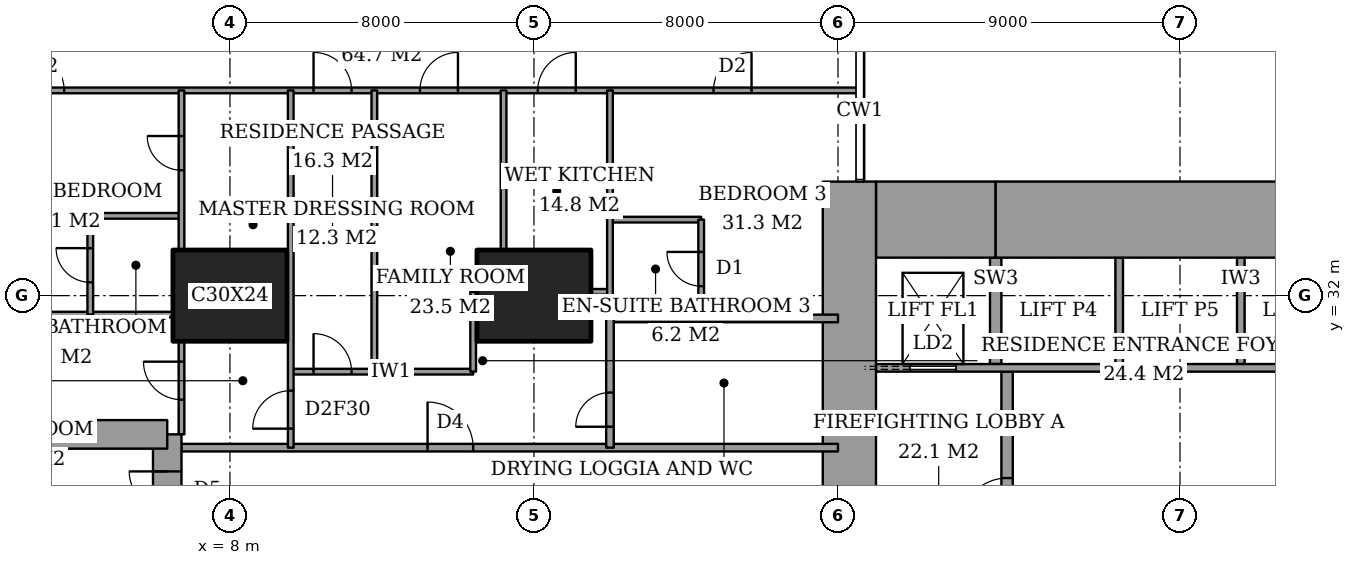
"""IFC4 building model, lengths in metres.
Left out: names, types, materials, properties, quantities, classifications, styles, units other than length and angle.
Written with IfcOpenShell. Run it as: python <this file> out.ifc"""

import sys

from ifc_helpers import new_model, si_unit, direction, frame, frame_2d, origin, origin_2d, place, context, subcontext, project, spatial, rectangle, extrude, element, fill, save


model = new_model("IFC4")
c1 = context("Model", 3, precision=1e-05, world=origin(), true_north=direction((0.0, 1.0)))
c2 = subcontext(c1, "Body", "Model", "MODEL_VIEW")
j1 = project(units=[si_unit("LENGTHUNIT", "METRE"), si_unit("PLANEANGLEUNIT", "RADIAN")], contexts=[c1])
p1 = place(None, origin())
s1 = spatial("IfcSite", under=j1, at=p1, CompositionType="ELEMENT")
p2 = place(p1, origin())
s2 = spatial("IfcBuilding", under=s1, at=p2, CompositionType="ELEMENT")
p3 = place(p2, frame((0.0, 0.0, 150.2)))
s3 = spatial("IfcBuildingStorey", under=s2, at=p3, CompositionType="ELEMENT", Elevation=150.2)
for number, where, z_axis, x_axis in (
    (1, (8.0, 32.0, 0.0), (0.0, 0.0, 1.0), (1.0, 0.0, 0.0)),
    (2, (16.0, 32.0, 0.0), (0.0, 0.0, 1.0), (1.0, 0.0, 0.0)),
):
    element("IfcColumn", number, at=place(p3, frame(where, z_axis=z_axis, x_axis=x_axis)), inside=s3, PredefinedType="COLUMN", context=c2, shape_type="SweptSolid", body=[
        extrude(rectangle(XDim=3.0, YDim=2.4, at=origin_2d()), origin(), (0.0, 0.0, 1.0), 3.6),
    ])
p4 = place(p3, frame((25.0, 34.0, 0.0), z_axis=(0.0, 0.0, 1.0), x_axis=(1.0, 0.0, 0.0)))
e3 = element("IfcWall", 3, at=p4, inside=s3, PredefinedType="SHEAR", context=c2, shape_type="SweptSolid", body=[
    extrude(rectangle(XDim=3.15, YDim=2.0, at=frame_2d((1.575, 0.0))), origin(), (0.0, 0.0, 1.0), 3.6),
])
p5 = place(p3, frame((28.15, 34.0, 0.0), z_axis=(0.0, 0.0, 1.0), x_axis=(1.0, 0.0, 0.0)))
e4 = element("IfcWall", 4, at=p5, inside=s3, PredefinedType="SHEAR", context=c2, shape_type="SweptSolid", body=[
    extrude(rectangle(XDim=9.7, YDim=2.0, at=frame_2d((4.85, 0.0))), origin(), (0.0, 0.0, 1.0), 3.6),
])
p6 = place(p3, frame((24.3, 23.15, 0.0), z_axis=(0.0, 0.0, 1.0), x_axis=(0.0, 1.0, 0.0)))
e5 = element("IfcWall", 5, at=p6, inside=s3, PredefinedType="SHEAR", context=c2, shape_type="SweptSolid", body=[
    extrude(rectangle(XDim=11.85, YDim=1.4, at=frame_2d((5.925, 0.0))), origin(), (0.0, 0.0, 1.0), 3.6),
])
p7 = place(p6, frame((0.75, 0.0, 0.0)))
e6 = element("IfcOpeningElement", 6, at=p7, cuts=e5, PredefinedType="OPENING", context=c2, shape_type="SweptSolid", body=[
    extrude(rectangle(XDim=1.8, YDim=2.4, at=frame_2d((0.9, 1.2))), frame((0.0, 0.71, 0.0), z_axis=(0.0, -1.0, 0.0), x_axis=(1.0, 0.0, 0.0)), (0.0, 0.0, 1.0), 1.42),
])
p8 = place(p3, frame((28.45, 23.3, 0.0), z_axis=(0.0, 0.0, 1.0), x_axis=(0.0, 1.0, 0.0)))
e7 = element("IfcWall", 7, at=p8, inside=s3, PredefinedType="PARTITIONING", context=c2, shape_type="SweptSolid", body=[
    extrude(rectangle(XDim=6.7, YDim=0.3, at=frame_2d((3.35, 0.0))), origin(), (0.0, 0.0, 1.0), 3.6),
])
p9 = place(p8, frame((2.7, 0.0, 0.0)))
e8 = element("IfcOpeningElement", 8, at=p9, cuts=e7, PredefinedType="OPENING", context=c2, shape_type="SweptSolid", body=[
    extrude(rectangle(XDim=1.2, YDim=2.1, at=frame_2d((0.6, 1.05))), frame((0.0, 0.16, 0.0), z_axis=(0.0, -1.0, 0.0), x_axis=(1.0, 0.0, 0.0)), (0.0, 0.0, 1.0), 0.32),
])
p10 = place(p3, frame((6.35, 19.65, 0.0), z_axis=(0.0, 0.0, 1.0), x_axis=(0.0, 1.0, 0.0)))
e9 = element("IfcWall", 9, at=p10, inside=s3, PredefinedType="SHEAR", context=c2, shape_type="SweptSolid", body=[
    extrude(rectangle(XDim=8.7, YDim=0.75, at=frame_2d((4.35, 0.0))), origin(), (0.0, 0.0, 1.0), 3.6),
])
p11 = place(p10, frame((6.725, 0.0, 0.0)))
e10 = element("IfcOpeningElement", 10, at=p11, cuts=e9, PredefinedType="OPENING", context=c2, shape_type="SweptSolid", body=[
    extrude(rectangle(XDim=1.0, YDim=2.1, at=frame_2d((0.5, 1.05))), frame((0.0, 0.385, 0.0), z_axis=(0.0, -1.0, 0.0), x_axis=(1.0, 0.0, 0.0)), (0.0, 0.0, 1.0), 0.77),
])
p12 = place(p3, frame((6.35, 28.35, 0.0), z_axis=(0.0, 0.0, 1.0), x_axis=(-1.0, 0.0, 0.0)))
e11 = element("IfcWall", 11, at=p12, inside=s3, PredefinedType="SHEAR", context=c2, shape_type="SweptSolid", body=[
    extrude(rectangle(XDim=4.45, YDim=0.75, at=frame_2d((2.225, 0.0))), origin(), (0.0, 0.0, 1.0), 3.6),
])
p13 = place(p3, frame((6.725, 28.0, 0.0), z_axis=(0.0, 0.0, 1.0), x_axis=(1.0, 0.0, 0.0)))
e12 = element("IfcWall", 12, at=p13, inside=s3, PredefinedType="PARTITIONING", context=c2, shape_type="SweptSolid", body=[
    extrude(rectangle(XDim=17.275, YDim=0.2, at=frame_2d((8.637, 0.0))), origin(), (0.0, 0.0, 1.0), 3.35),
])
p14 = place(p13, frame((6.475, 0.0, 0.0)))
e13 = element("IfcOpeningElement", 13, at=p14, cuts=e12, PredefinedType="OPENING", context=c2, shape_type="SweptSolid", body=[
    extrude(rectangle(XDim=1.2, YDim=2.4, at=frame_2d((0.6, 1.2))), frame((0.0, 0.11, 0.0), z_axis=(0.0, -1.0, 0.0), x_axis=(1.0, 0.0, 0.0)), (0.0, 0.0, 1.0), 0.22),
])
p15 = place(p3, frame((9.6, 30.0, 0.0), z_axis=(0.0, 0.0, 1.0), x_axis=(1.0, 0.0, 0.0)))
e14 = element("IfcWall", 14, at=p15, inside=s3, PredefinedType="PARTITIONING", context=c2, shape_type="SweptSolid", body=[
    extrude(rectangle(XDim=4.8, YDim=0.15, at=frame_2d((2.4, 0.0))), origin(), (0.0, 0.0, 1.0), 3.35),
])
p16 = place(p15, frame((0.6, 0.0, 0.0)))
e15 = element("IfcOpeningElement", 15, at=p16, cuts=e14, PredefinedType="OPENING", context=c2, shape_type="SweptSolid", body=[
    extrude(rectangle(XDim=1.0, YDim=2.1, at=frame_2d((0.5, 1.05))), frame((0.0, 0.085, 0.0), z_axis=(0.0, -1.0, 0.0), x_axis=(1.0, 0.0, 0.0)), (0.0, 0.0, 1.0), 0.17),
])
p17 = place(p3, frame((18.0, 31.4, 0.0), z_axis=(0.0, 0.0, 1.0), x_axis=(1.0, 0.0, 0.0)))
e16 = element("IfcWall", 16, at=p17, inside=s3, PredefinedType="PARTITIONING", context=c2, shape_type="SweptSolid", body=[
    extrude(rectangle(XDim=6.0, YDim=0.2, at=frame_2d((3.0, 0.0))), origin(), (0.0, 0.0, 1.0), 3.35),
])
p18 = place(p3, frame((1.35, 31.5, 0.0), z_axis=(0.0, 0.0, 1.0), x_axis=(1.0, 0.0, 0.0)))
e17 = element("IfcWall", 17, at=p18, inside=s3, PredefinedType="PARTITIONING", context=c2, shape_type="SweptSolid", body=[
    extrude(rectangle(XDim=5.15, YDim=0.15, at=frame_2d((2.575, 0.0))), origin(), (0.0, 0.0, 1.0), 3.35),
])
p19 = place(p3, frame((17.5, 32.1, 0.0), z_axis=(0.0, 0.0, 1.0), x_axis=(1.0, 0.0, 0.0)))
e18 = element("IfcWall", 18, at=p19, inside=s3, PredefinedType="PARTITIONING", context=c2, shape_type="SweptSolid", body=[
    extrude(rectangle(XDim=0.5, YDim=0.15, at=frame_2d((0.25, 0.0))), origin(), (0.0, 0.0, 1.0), 2.634),
])
p20 = place(p3, frame((18.0, 34.0, 0.0), z_axis=(0.0, 0.0, 1.0), x_axis=(1.0, 0.0, 0.0)))
e19 = element("IfcWall", 19, at=p20, inside=s3, PredefinedType="PARTITIONING", context=c2, shape_type="SweptSolid", body=[
    extrude(rectangle(XDim=2.4, YDim=0.15, at=frame_2d((1.2, 0.0))), origin(), (0.0, 0.0, 1.0), 3.35),
])
p21 = place(p3, frame((4.325, 34.1, 0.0), z_axis=(0.0, 0.0, 1.0), x_axis=(1.0, 0.0, 0.0)))
e20 = element("IfcWall", 20, at=p21, inside=s3, PredefinedType="PARTITIONING", context=c2, shape_type="SweptSolid", body=[
    extrude(rectangle(XDim=2.4, YDim=0.15, at=frame_2d((1.2, 0.0))), origin(), (0.0, 0.0, 1.0), 3.35),
])
p22 = place(p3, frame((-0.45, 37.4, 0.0), z_axis=(0.0, 0.0, 1.0), x_axis=(1.0, 0.0, 0.0)))
e21 = element("IfcWall", 21, at=p22, inside=s3, PredefinedType="PARTITIONING", context=c2, shape_type="SweptSolid", body=[
    extrude(rectangle(XDim=25.011, YDim=0.15, at=frame_2d((12.505, 0.0))), origin(), (0.0, 0.0, 1.0), 3.35),
])
p23 = place(p22, frame((10.65, 0.0, 0.0)))
e22 = element("IfcOpeningElement", 22, at=p23, cuts=e21, PredefinedType="OPENING", context=c2, shape_type="SweptSolid", body=[
    extrude(rectangle(XDim=1.0, YDim=2.1, at=frame_2d((0.5, 1.05))), frame((0.0, 0.085, 0.0), z_axis=(0.0, -1.0, 0.0), x_axis=(1.0, 0.0, 0.0)), (0.0, 0.0, 1.0), 0.17),
])
p24 = place(p22, frame((3.087, 0.0, 0.0)))
e23 = element("IfcOpeningElement", 23, at=p24, cuts=e21, PredefinedType="OPENING", context=c2, shape_type="SweptSolid", body=[
    extrude(rectangle(XDim=1.0, YDim=2.1, at=frame_2d((0.5, 1.05))), frame((0.0, 0.085, 0.0), z_axis=(0.0, -1.0, 0.0), x_axis=(1.0, 0.0, 0.0)), (0.0, 0.0, 1.0), 0.17),
])
p25 = place(p22, frame((13.45, 0.0, 0.0)))
e24 = element("IfcOpeningElement", 24, at=p25, cuts=e21, PredefinedType="OPENING", context=c2, shape_type="SweptSolid", body=[
    extrude(rectangle(XDim=1.0, YDim=2.1, at=frame_2d((0.5, 1.05))), frame((0.0, 0.085, 0.0), z_axis=(0.0, -1.0, 0.0), x_axis=(1.0, 0.0, 0.0)), (0.0, 0.0, 1.0), 0.17),
])
p26 = place(p22, frame((16.55, 0.0, 0.0)))
e25 = element("IfcOpeningElement", 25, at=p26, cuts=e21, PredefinedType="OPENING", context=c2, shape_type="SweptSolid", body=[
    extrude(rectangle(XDim=1.0, YDim=2.1, at=frame_2d((0.5, 1.05))), frame((0.0, 0.085, 0.0), z_axis=(0.0, -1.0, 0.0), x_axis=(1.0, 0.0, 0.0)), (0.0, 0.0, 1.0), 0.17),
])
p27 = place(p22, frame((21.175, 0.0, 0.0)))
e26 = element("IfcOpeningElement", 26, at=p27, cuts=e21, PredefinedType="OPENING", context=c2, shape_type="SweptSolid", body=[
    extrude(rectangle(XDim=1.0, YDim=2.1, at=frame_2d((0.5, 1.05))), frame((0.0, 0.085, 0.0), z_axis=(0.0, -1.0, 0.0), x_axis=(1.0, 0.0, 0.0)), (0.0, 0.0, 1.0), 0.17),
])
p28 = place(p3, frame((4.325, 31.5, 0.0), z_axis=(0.0, 0.0, 1.0), x_axis=(0.0, 1.0, 0.0)))
e27 = element("IfcWall", 27, at=p28, inside=s3, PredefinedType="PARTITIONING", context=c2, shape_type="SweptSolid", body=[
    extrude(rectangle(XDim=2.6, YDim=0.15, at=frame_2d((1.3, 0.0))), origin(), (0.0, 0.0, 1.0), 3.35),
])
p29 = place(p28, frame((0.85, 0.0, 0.0)))
e28 = element("IfcOpeningElement", 28, at=p29, cuts=e27, PredefinedType="OPENING", context=c2, shape_type="SweptSolid", body=[
    extrude(rectangle(XDim=0.9, YDim=2.1, at=frame_2d((0.45, 1.05))), frame((0.0, 0.085, 0.0), z_axis=(0.0, -1.0, 0.0), x_axis=(1.0, 0.0, 0.0)), (0.0, 0.0, 1.0), 0.17),
])
p30 = place(p3, frame((6.725, 28.35, 0.0), z_axis=(0.0, 0.0, 1.0), x_axis=(0.0, 1.0, 0.0)))
e29 = element("IfcWall", 29, at=p30, inside=s3, PredefinedType="PARTITIONING", context=c2, shape_type="SweptSolid", body=[
    extrude(rectangle(XDim=2.45, YDim=0.15, at=frame_2d((1.225, 0.0))), origin(), (0.0, 0.0, 1.0), 3.35),
])
p31 = place(p30, frame((0.913, 0.0, 0.0)))
e30 = element("IfcOpeningElement", 30, at=p31, cuts=e29, PredefinedType="OPENING", context=c2, shape_type="SweptSolid", body=[
    extrude(rectangle(XDim=1.0, YDim=2.1, at=frame_2d((0.5, 1.05))), frame((0.0, 0.085, 0.0), z_axis=(0.0, -1.0, 0.0), x_axis=(1.0, 0.0, 0.0)), (0.0, 0.0, 1.0), 0.17),
])
p32 = place(p3, frame((6.725, 33.2, 0.0), z_axis=(0.0, 0.0, 1.0), x_axis=(0.0, 1.0, 0.0)))
e31 = element("IfcWall", 31, at=p32, inside=s3, PredefinedType="PARTITIONING", context=c2, shape_type="SweptSolid", body=[
    extrude(rectangle(XDim=4.2, YDim=0.15, at=frame_2d((2.1, 0.0))), origin(), (0.0, 0.0, 1.0), 3.35),
])
p33 = place(p32, frame((2.1, 0.0, 0.0)))
e32 = element("IfcOpeningElement", 32, at=p33, cuts=e31, PredefinedType="OPENING", context=c2, shape_type="SweptSolid", body=[
    extrude(rectangle(XDim=0.9, YDim=2.1, at=frame_2d((0.45, 1.05))), frame((0.0, 0.085, 0.0), z_axis=(0.0, -1.0, 0.0), x_axis=(1.0, 0.0, 0.0)), (0.0, 0.0, 1.0), 0.17),
])
p34 = place(p3, frame((9.6, 28.0, 0.0), z_axis=(0.0, 0.0, 1.0), x_axis=(0.0, 1.0, 0.0)))
e33 = element("IfcWall", 33, at=p34, inside=s3, PredefinedType="PARTITIONING", context=c2, shape_type="SweptSolid", body=[
    extrude(rectangle(XDim=9.4, YDim=0.15, at=frame_2d((4.7, 0.0))), origin(), (0.0, 0.0, 1.0), 3.35),
])
p35 = place(p34, frame((0.5, 0.0, 0.0)))
e34 = element("IfcOpeningElement", 34, at=p35, cuts=e33, PredefinedType="OPENING", context=c2, shape_type="SweptSolid", body=[
    extrude(rectangle(XDim=1.0, YDim=2.1, at=frame_2d((0.5, 1.05))), frame((0.0, 0.085, 0.0), z_axis=(0.0, -1.0, 0.0), x_axis=(1.0, 0.0, 0.0)), (0.0, 0.0, 1.0), 0.17),
])
p36 = place(p3, frame((11.8, 30.0, 0.0), z_axis=(0.0, 0.0, 1.0), x_axis=(0.0, 1.0, 0.0)))
e35 = element("IfcWall", 35, at=p36, inside=s3, PredefinedType="PARTITIONING", context=c2, shape_type="SweptSolid", body=[
    extrude(rectangle(XDim=7.4, YDim=0.15, at=frame_2d((3.7, 0.0))), origin(), (0.0, 0.0, 1.0), 3.35),
])
p37 = place(p3, frame((14.4, 30.0, 0.0), z_axis=(0.0, 0.0, 1.0), x_axis=(0.0, 1.0, 0.0)))
e36 = element("IfcWall", 36, at=p37, inside=s3, PredefinedType="PARTITIONING", context=c2, shape_type="SweptSolid", body=[
    extrude(rectangle(XDim=2.1, YDim=0.15, at=frame_2d((1.05, 0.0))), origin(), (0.0, 0.0, 1.0), 3.35),
])
p38 = place(p3, frame((15.2, 33.2, 0.0), z_axis=(0.0, 0.0, 1.0), x_axis=(0.0, 1.0, 0.0)))
e37 = element("IfcWall", 37, at=p38, inside=s3, PredefinedType="PARTITIONING", context=c2, shape_type="SweptSolid", body=[
    extrude(rectangle(XDim=4.2, YDim=0.15, at=frame_2d((2.1, 0.0))), origin(), (0.0, 0.0, 1.0), 3.35),
])
p39 = place(p3, frame((18.0, 28.0, 0.0), z_axis=(0.0, 0.0, 1.0), x_axis=(0.0, 1.0, 0.0)))
e38 = element("IfcWall", 38, at=p39, inside=s3, PredefinedType="PARTITIONING", context=c2, shape_type="SweptSolid", body=[
    extrude(rectangle(XDim=3.4, YDim=0.2, at=frame_2d((1.7, 0.0))), origin(), (0.0, 0.0, 1.0), 3.35),
])
p40 = place(p39, frame((0.55, 0.0, 0.0)))
e39 = element("IfcOpeningElement", 39, at=p40, cuts=e38, PredefinedType="OPENING", context=c2, shape_type="SweptSolid", body=[
    extrude(rectangle(XDim=0.9, YDim=2.1, at=frame_2d((0.45, 1.05))), frame((0.0, 0.11, 0.0), z_axis=(0.0, -1.0, 0.0), x_axis=(1.0, 0.0, 0.0)), (0.0, 0.0, 1.0), 0.22),
])
p41 = place(p3, frame((18.0, 31.4, 0.0), z_axis=(0.0, 0.0, 1.0), x_axis=(0.0, 1.0, 0.0)))
e40 = element("IfcWall", 40, at=p41, inside=s3, PredefinedType="PARTITIONING", context=c2, shape_type="SweptSolid", body=[
    extrude(rectangle(XDim=6.0, YDim=0.15, at=frame_2d((3.0, 0.0))), origin(), (0.0, 0.0, 1.0), 3.35),
])
p42 = place(p3, frame((20.4, 31.4, 0.0), z_axis=(0.0, 0.0, 1.0), x_axis=(0.0, 1.0, 0.0)))
e41 = element("IfcWall", 41, at=p42, inside=s3, PredefinedType="PARTITIONING", context=c2, shape_type="SweptSolid", body=[
    extrude(rectangle(XDim=2.6, YDim=0.15, at=frame_2d((1.3, 0.0))), origin(), (0.0, 0.0, 1.0), 3.35),
])
p43 = place(p42, frame((0.85, 0.0, 0.0)))
e42 = element("IfcOpeningElement", 42, at=p43, cuts=e41, PredefinedType="OPENING", context=c2, shape_type="SweptSolid", body=[
    extrude(rectangle(XDim=0.9, YDim=2.1, at=frame_2d((0.45, 1.05))), frame((0.0, 0.085, 0.0), z_axis=(0.0, -1.0, 0.0), x_axis=(1.0, 0.0, 0.0)), (0.0, 0.0, 1.0), 0.17),
])
p44 = place(p3, frame((25.0, 30.1, 0.0), z_axis=(0.0, 0.0, 1.0), x_axis=(1.0, 0.0, 0.0)))
e43 = element("IfcWall", 43, at=p44, inside=s3, PredefinedType="PARTITIONING", context=c2, shape_type="SweptSolid", body=[
    extrude(rectangle(XDim=12.7, YDim=0.2, at=frame_2d((6.35, 0.0))), origin(), (0.0, 0.0, 1.0), 3.6),
])
p45 = place(p44, frame((0.9, 0.0, 0.0)))
e44 = element("IfcOpeningElement", 44, at=p45, cuts=e43, PredefinedType="OPENING", context=c2, shape_type="SweptSolid", body=[
    extrude(rectangle(XDim=1.2, YDim=2.1, at=frame_2d((0.6, 1.05))), frame((0.0, 0.11, 0.0), z_axis=(0.0, -1.0, 0.0), x_axis=(1.0, 0.0, 0.0)), (0.0, 0.0, 1.0), 0.22),
])
for number, where, z_axis, x_axis in (
    (45, (31.4, 30.2, 0.0), (0.0, 0.0, 1.0), (0.0, 1.0, 0.0)),
    (46, (34.6, 30.2, 0.0), (0.0, 0.0, 1.0), (0.0, 1.0, 0.0)),
):
    element("IfcWall", number, at=place(p3, frame(where, z_axis=z_axis, x_axis=x_axis)), inside=s3, PredefinedType="PARTITIONING", context=c2, shape_type="SweptSolid", body=[
        extrude(rectangle(XDim=2.8, YDim=0.2, at=frame_2d((1.4, 0.0))), origin(), (0.0, 0.0, 1.0), 3.6),
    ])
p46 = place(p3, frame((28.15, 30.2, 0.0), z_axis=(0.0, 0.0, 1.0), x_axis=(0.0, 1.0, 0.0)))
e47 = element("IfcWall", 47, at=p46, inside=s3, PredefinedType="SHEAR", context=c2, shape_type="SweptSolid", body=[
    extrude(rectangle(XDim=2.8, YDim=0.3, at=frame_2d((1.4, 0.0))), origin(), (0.0, 0.0, 1.0), 3.6),
])
p47 = place(p23, origin())
e48 = element("IfcDoor", 48, at=p47, inside=s3, OperationType="SINGLE_SWING_RIGHT", PredefinedType="DOOR", context=c2, shape_type="SweptSolid", body=[
    extrude(rectangle(XDim=1.0, YDim=2.1, at=frame_2d((0.5, 1.05))), frame((0.0, 0.025, 0.0), z_axis=(0.0, -1.0, 0.0), x_axis=(1.0, 0.0, 0.0)), (0.0, 0.0, 1.0), 0.05),
])
fill(e22, e48)
p48 = place(p29, origin())
e49 = element("IfcDoor", 49, at=p48, inside=s3, OperationType="SINGLE_SWING_LEFT", PredefinedType="DOOR", context=c2, shape_type="SweptSolid", body=[
    extrude(rectangle(XDim=0.9, YDim=2.1, at=frame_2d((0.45, 1.05))), frame((0.0, 0.025, 0.0), z_axis=(0.0, -1.0, 0.0), x_axis=(1.0, 0.0, 0.0)), (0.0, 0.0, 1.0), 0.05),
])
fill(e28, e49)
p49 = place(p24, origin())
e50 = element("IfcDoor", 50, at=p49, inside=s3, OperationType="SINGLE_SWING_RIGHT", PredefinedType="DOOR", context=c2, shape_type="SweptSolid", body=[
    extrude(rectangle(XDim=1.0, YDim=2.1, at=frame_2d((0.5, 1.05))), frame((0.0, 0.025, 0.0), z_axis=(0.0, -1.0, 0.0), x_axis=(1.0, 0.0, 0.0)), (0.0, 0.0, 1.0), 0.05),
])
fill(e23, e50)
p50 = place(p31, origin())
e51 = element("IfcDoor", 51, at=p50, inside=s3, OperationType="SINGLE_SWING_LEFT", PredefinedType="DOOR", context=c2, shape_type="SweptSolid", body=[
    extrude(rectangle(XDim=1.0, YDim=2.1, at=frame_2d((0.5, 1.05))), frame((0.0, 0.025, 0.0), z_axis=(0.0, -1.0, 0.0), x_axis=(1.0, 0.0, 0.0)), (0.0, 0.0, 1.0), 0.05),
])
fill(e30, e51)
p51 = place(p33, origin())
e52 = element("IfcDoor", 52, at=p51, inside=s3, OperationType="SINGLE_SWING_LEFT", PredefinedType="DOOR", context=c2, shape_type="SweptSolid", body=[
    extrude(rectangle(XDim=0.9, YDim=2.1, at=frame_2d((0.45, 1.05))), frame((0.0, 0.025, 0.0), z_axis=(0.0, -1.0, 0.0), x_axis=(1.0, 0.0, 0.0)), (0.0, 0.0, 1.0), 0.05),
])
fill(e32, e52)
p52 = place(p35, origin())
e53 = element("IfcDoor", 53, at=p52, inside=s3, OperationType="SINGLE_SWING_RIGHT", PredefinedType="DOOR", context=c2, shape_type="SweptSolid", body=[
    extrude(rectangle(XDim=1.0, YDim=2.1, at=frame_2d((0.5, 1.05))), frame((0.0, 0.025, 0.0), z_axis=(0.0, -1.0, 0.0), x_axis=(1.0, 0.0, 0.0)), (0.0, 0.0, 1.0), 0.05),
])
fill(e34, e53)
p53 = place(p14, origin())
e54 = element("IfcDoor", 54, at=p53, inside=s3, OperationType="SINGLE_SWING_RIGHT", PredefinedType="DOOR", context=c2, shape_type="SweptSolid", body=[
    extrude(rectangle(XDim=1.2, YDim=2.4, at=frame_2d((0.6, 1.2))), frame((0.0, 0.025, 0.0), z_axis=(0.0, -1.0, 0.0), x_axis=(1.0, 0.0, 0.0)), (0.0, 0.0, 1.0), 0.05),
])
fill(e13, e54)
p54 = place(p16, origin())
e55 = element("IfcDoor", 55, at=p54, inside=s3, OperationType="SINGLE_SWING_RIGHT", PredefinedType="DOOR", context=c2, shape_type="SweptSolid", body=[
    extrude(rectangle(XDim=1.0, YDim=2.1, at=frame_2d((0.5, 1.05))), frame((0.0, 0.025, 0.0), z_axis=(0.0, -1.0, 0.0), x_axis=(1.0, 0.0, 0.0)), (0.0, 0.0, 1.0), 0.05),
])
fill(e15, e55)
p55 = place(p25, origin())
e56 = element("IfcDoor", 56, at=p55, inside=s3, OperationType="SINGLE_SWING_LEFT", PredefinedType="DOOR", context=c2, shape_type="SweptSolid", body=[
    extrude(rectangle(XDim=1.0, YDim=2.1, at=frame_2d((0.5, 1.05))), frame((0.0, 0.025, 0.0), z_axis=(0.0, -1.0, 0.0), x_axis=(1.0, 0.0, 0.0)), (0.0, 0.0, 1.0), 0.05),
])
fill(e24, e56)
p56 = place(p26, origin())
e57 = element("IfcDoor", 57, at=p56, inside=s3, OperationType="SINGLE_SWING_LEFT", PredefinedType="DOOR", context=c2, shape_type="SweptSolid", body=[
    extrude(rectangle(XDim=1.0, YDim=2.1, at=frame_2d((0.5, 1.05))), frame((0.0, 0.025, 0.0), z_axis=(0.0, -1.0, 0.0), x_axis=(1.0, 0.0, 0.0)), (0.0, 0.0, 1.0), 0.05),
])
fill(e25, e57)
p57 = place(p43, origin())
e58 = element("IfcDoor", 58, at=p57, inside=s3, OperationType="SINGLE_SWING_LEFT", PredefinedType="DOOR", context=c2, shape_type="SweptSolid", body=[
    extrude(rectangle(XDim=0.9, YDim=2.1, at=frame_2d((0.45, 1.05))), frame((0.0, 0.025, 0.0), z_axis=(0.0, -1.0, 0.0), x_axis=(1.0, 0.0, 0.0)), (0.0, 0.0, 1.0), 0.05),
])
fill(e42, e58)
p58 = place(p27, origin())
e59 = element("IfcDoor", 59, at=p58, inside=s3, OperationType="SINGLE_SWING_LEFT", PredefinedType="DOOR", context=c2, shape_type="SweptSolid", body=[
    extrude(rectangle(XDim=1.0, YDim=2.1, at=frame_2d((0.5, 1.05))), frame((0.0, 0.025, 0.0), z_axis=(0.0, -1.0, 0.0), x_axis=(1.0, 0.0, 0.0)), (0.0, 0.0, 1.0), 0.05),
])
fill(e26, e59)
p59 = place(p40, origin())
e60 = element("IfcDoor", 60, at=p59, inside=s3, OperationType="SINGLE_SWING_RIGHT", PredefinedType="DOOR", context=c2, shape_type="SweptSolid", body=[
    extrude(rectangle(XDim=0.9, YDim=2.1, at=frame_2d((0.45, 1.05))), frame((0.0, 0.025, 0.0), z_axis=(0.0, -1.0, 0.0), x_axis=(1.0, 0.0, 0.0)), (0.0, 0.0, 1.0), 0.05),
])
fill(e39, e60)
p60 = place(p9, origin())
e61 = element("IfcDoor", 61, at=p60, inside=s3, OperationType="SINGLE_SWING_RIGHT", PredefinedType="DOOR", context=c2, shape_type="SweptSolid", body=[
    extrude(rectangle(XDim=1.2, YDim=2.1, at=frame_2d((0.6, 1.05))), frame((0.0, 0.025, 0.0), z_axis=(0.0, -1.0, 0.0), x_axis=(1.0, 0.0, 0.0)), (0.0, 0.0, 1.0), 0.05),
])
fill(e8, e61)
p61 = place(p45, origin())
e62 = element("IfcDoor", 62, at=p61, inside=s3, OperationType="SLIDING_TO_LEFT", PredefinedType="DOOR", context=c2, shape_type="SweptSolid", body=[
    extrude(rectangle(XDim=1.2, YDim=2.1, at=frame_2d((0.6, 1.05))), frame((0.0, 0.025, 0.0), z_axis=(0.0, -1.0, 0.0), x_axis=(1.0, 0.0, 0.0)), (0.0, 0.0, 1.0), 0.05),
])
fill(e44, e62)
p62 = place(p11, origin())
e63 = element("IfcDoor", 63, at=p62, inside=s3, OperationType="SINGLE_SWING_LEFT", PredefinedType="DOOR", context=c2, shape_type="SweptSolid", body=[
    extrude(rectangle(XDim=1.0, YDim=2.1, at=frame_2d((0.5, 1.05))), frame((0.0, 0.025, 0.0), z_axis=(0.0, -1.0, 0.0), x_axis=(1.0, 0.0, 0.0)), (0.0, 0.0, 1.0), 0.05),
])
fill(e10, e63)
save(model, sys.argv[1])
